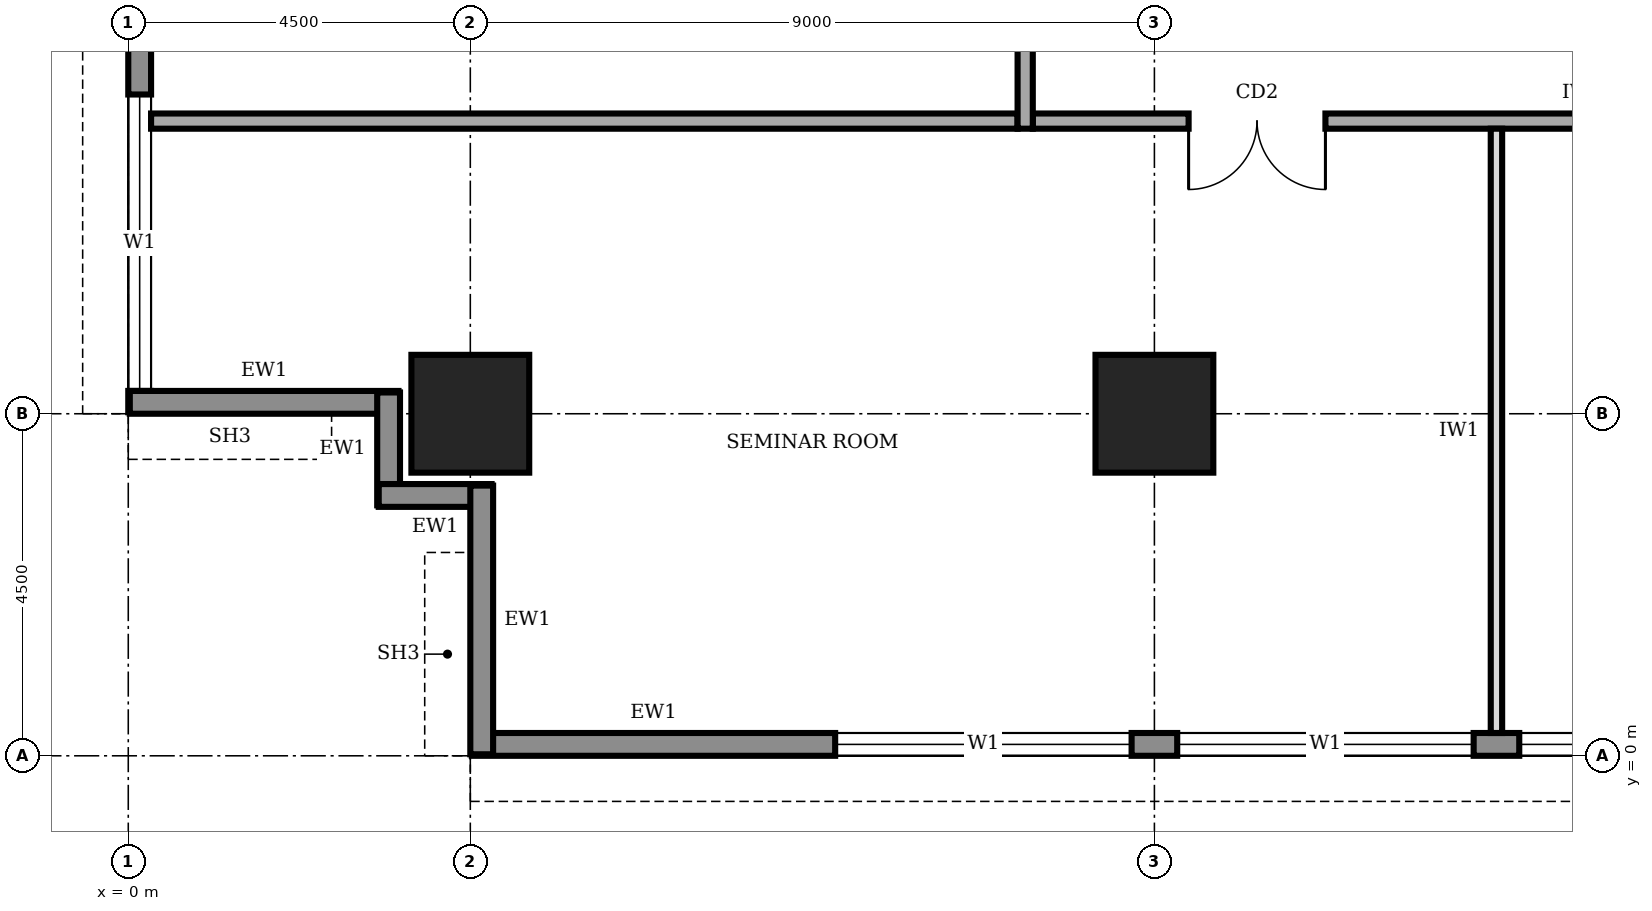
"""IFC4 building model, lengths in metres.
Left out: names, types, materials, properties, quantities, classifications, styles, units other than length and angle.
Written with IfcOpenShell. Run it as: python <this file> out.ifc"""

import sys

from ifc_helpers import new_model, si_unit, direction, frame, frame_2d, origin, origin_2d, place, context, subcontext, project, spatial, rectangle, extrude, element, fill, save


model = new_model("IFC4")
c1 = context("Model", 3, precision=1e-05, world=origin(), true_north=direction((0.0, 1.0)))
c2 = subcontext(c1, "Body", "Model", "MODEL_VIEW")
j1 = project(units=[si_unit("LENGTHUNIT", "METRE"), si_unit("PLANEANGLEUNIT", "RADIAN")], contexts=[c1])
p1 = place(None, origin())
s1 = spatial("IfcSite", under=j1, at=p1, CompositionType="ELEMENT")
p2 = place(p1, origin())
s2 = spatial("IfcBuilding", under=s1, at=p2, CompositionType="ELEMENT")
p3 = place(p2, frame((0.0, 0.0, 217.0)))
s3 = spatial("IfcBuildingStorey", under=s2, at=p3, CompositionType="ELEMENT", Elevation=217.0)
for number, where, z_axis, x_axis in (
    (1, (4.5, 4.5, 0.0), (0.0, 0.0, 1.0), (1.0, 0.0, 0.0)),
    (2, (13.5, 4.5, 0.0), (0.0, 0.0, 1.0), (1.0, 0.0, 0.0)),
):
    element("IfcColumn", number, at=place(p3, frame(where, z_axis=z_axis, x_axis=x_axis)), inside=s3, PredefinedType="COLUMN", context=c2, shape_type="SweptSolid", body=[
        extrude(rectangle(XDim=1.55, YDim=1.55, at=origin_2d()), origin(), (0.0, 0.0, 1.0), 4.0),
    ])
p4 = place(p3, frame((4.52, 0.15, 0.0), z_axis=(0.0, 0.0, 1.0), x_axis=(1.0, 0.0, 0.0)))
e3 = element("IfcWall", 3, at=p4, inside=s3, PredefinedType="STANDARD", context=c2, shape_type="SweptSolid", body=[
    extrude(rectangle(XDim=31.46, YDim=0.3, at=frame_2d((15.73, 0.0))), origin(), (0.0, 0.0, 1.0), 3.75),
])
p5 = place(p4, frame((4.78, 0.0, 0.9)))
e4 = element("IfcOpeningElement", 4, at=p5, cuts=e3, PredefinedType="OPENING", context=c2, shape_type="SweptSolid", body=[
    extrude(rectangle(XDim=3.9, YDim=2.2, at=frame_2d((1.95, 1.1))), frame((0.0, 0.16, 0.0), z_axis=(0.0, -1.0, 0.0), x_axis=(1.0, 0.0, 0.0)), (0.0, 0.0, 1.0), 0.32),
])
p6 = place(p4, frame((9.28, 0.0, 0.9)))
e5 = element("IfcOpeningElement", 5, at=p6, cuts=e3, PredefinedType="OPENING", context=c2, shape_type="SweptSolid", body=[
    extrude(rectangle(XDim=3.9, YDim=2.2, at=frame_2d((1.95, 1.1))), frame((0.0, 0.16, 0.0), z_axis=(0.0, -1.0, 0.0), x_axis=(1.0, 0.0, 0.0)), (0.0, 0.0, 1.0), 0.32),
])
p7 = place(p4, frame((13.78, 0.0, 0.9)))
e6 = element("IfcOpeningElement", 6, at=p7, cuts=e3, PredefinedType="OPENING", context=c2, shape_type="SweptSolid", body=[
    extrude(rectangle(XDim=3.9, YDim=2.2, at=frame_2d((1.95, 1.1))), frame((0.0, 0.16, 0.0), z_axis=(0.0, -1.0, 0.0), x_axis=(1.0, 0.0, 0.0)), (0.0, 0.0, 1.0), 0.32),
])
p8 = place(p4, frame((18.28, 0.0, 0.9)))
e7 = element("IfcOpeningElement", 7, at=p8, cuts=e3, PredefinedType="OPENING", context=c2, shape_type="SweptSolid", body=[
    extrude(rectangle(XDim=3.9, YDim=2.2, at=frame_2d((1.95, 1.1))), frame((0.0, 0.16, 0.0), z_axis=(0.0, -1.0, 0.0), x_axis=(1.0, 0.0, 0.0)), (0.0, 0.0, 1.0), 0.32),
])
p9 = place(p4, frame((22.78, 0.0, 0.9)))
e8 = element("IfcOpeningElement", 8, at=p9, cuts=e3, PredefinedType="OPENING", context=c2, shape_type="SweptSolid", body=[
    extrude(rectangle(XDim=3.9, YDim=2.2, at=frame_2d((1.95, 1.1))), frame((0.0, 0.16, 0.0), z_axis=(0.0, -1.0, 0.0), x_axis=(1.0, 0.0, 0.0)), (0.0, 0.0, 1.0), 0.32),
])
p10 = place(p4, frame((27.28, 0.0, 0.9)))
e9 = element("IfcOpeningElement", 9, at=p10, cuts=e3, PredefinedType="OPENING", context=c2, shape_type="SweptSolid", body=[
    extrude(rectangle(XDim=3.9, YDim=2.2, at=frame_2d((1.95, 1.1))), frame((0.0, 0.16, 0.0), z_axis=(0.0, -1.0, 0.0), x_axis=(1.0, 0.0, 0.0)), (0.0, 0.0, 1.0), 0.32),
])
p11 = place(p3, frame((0.15, 35.98, 0.0), z_axis=(0.0, 0.0, 1.0), x_axis=(0.0, -1.0, 0.0)))
e10 = element("IfcWall", 10, at=p11, inside=s3, PredefinedType="STANDARD", context=c2, shape_type="SweptSolid", body=[
    extrude(rectangle(XDim=31.46, YDim=0.3, at=frame_2d((15.73, 0.0))), origin(), (0.0, 0.0, 1.0), 3.75),
])
p12 = place(p11, frame((27.28, 0.0, 0.9)))
e11 = element("IfcOpeningElement", 11, at=p12, cuts=e10, PredefinedType="OPENING", context=c2, shape_type="SweptSolid", body=[
    extrude(rectangle(XDim=3.9, YDim=2.2, at=frame_2d((1.95, 1.1))), frame((0.0, 0.16, 0.0), z_axis=(0.0, -1.0, 0.0), x_axis=(1.0, 0.0, 0.0)), (0.0, 0.0, 1.0), 0.32),
])
p13 = place(p11, frame((22.78, 0.0, 0.9)))
e12 = element("IfcOpeningElement", 12, at=p13, cuts=e10, PredefinedType="OPENING", context=c2, shape_type="SweptSolid", body=[
    extrude(rectangle(XDim=3.9, YDim=2.2, at=frame_2d((1.95, 1.1))), frame((0.0, 0.16, 0.0), z_axis=(0.0, -1.0, 0.0), x_axis=(1.0, 0.0, 0.0)), (0.0, 0.0, 1.0), 0.32),
])
p14 = place(p11, frame((18.28, 0.0, 0.9)))
e13 = element("IfcOpeningElement", 13, at=p14, cuts=e10, PredefinedType="OPENING", context=c2, shape_type="SweptSolid", body=[
    extrude(rectangle(XDim=3.9, YDim=2.2, at=frame_2d((1.95, 1.1))), frame((0.0, 0.16, 0.0), z_axis=(0.0, -1.0, 0.0), x_axis=(1.0, 0.0, 0.0)), (0.0, 0.0, 1.0), 0.32),
])
p15 = place(p11, frame((13.78, 0.0, 0.9)))
e14 = element("IfcOpeningElement", 14, at=p15, cuts=e10, PredefinedType="OPENING", context=c2, shape_type="SweptSolid", body=[
    extrude(rectangle(XDim=3.9, YDim=2.2, at=frame_2d((1.95, 1.1))), frame((0.0, 0.16, 0.0), z_axis=(0.0, -1.0, 0.0), x_axis=(1.0, 0.0, 0.0)), (0.0, 0.0, 1.0), 0.32),
])
p16 = place(p11, frame((9.28, 0.0, 0.9)))
e15 = element("IfcOpeningElement", 15, at=p16, cuts=e10, PredefinedType="OPENING", context=c2, shape_type="SweptSolid", body=[
    extrude(rectangle(XDim=3.9, YDim=2.2, at=frame_2d((1.95, 1.1))), frame((0.0, 0.16, 0.0), z_axis=(0.0, -1.0, 0.0), x_axis=(1.0, 0.0, 0.0)), (0.0, 0.0, 1.0), 0.32),
])
p17 = place(p11, frame((4.78, 0.0, 0.9)))
e16 = element("IfcOpeningElement", 16, at=p17, cuts=e10, PredefinedType="OPENING", context=c2, shape_type="SweptSolid", body=[
    extrude(rectangle(XDim=3.9, YDim=2.2, at=frame_2d((1.95, 1.1))), frame((0.0, 0.16, 0.0), z_axis=(0.0, -1.0, 0.0), x_axis=(1.0, 0.0, 0.0)), (0.0, 0.0, 1.0), 0.32),
])
p18 = place(p3, frame((0.02, 4.65, 0.0), z_axis=(0.0, 0.0, 1.0), x_axis=(1.0, 0.0, 0.0)))
e17 = element("IfcWall", 17, at=p18, inside=s3, PredefinedType="STANDARD", context=c2, shape_type="SweptSolid", body=[
    extrude(rectangle(XDim=3.535, YDim=0.3, at=frame_2d((1.768, 0.0))), origin(), (0.0, 0.0, 1.0), 2.85),
])
for number, where, z_axis, x_axis in (
    (18, (3.425, 4.78, 0.0), (0.0, 0.0, 1.0), (0.0, -1.0, 0.0)),
    (19, (3.295, 3.425, 0.0), (0.0, 0.0, 1.0), (1.0, 0.0, 0.0)),
):
    element("IfcWall", number, at=place(p3, frame(where, z_axis=z_axis, x_axis=x_axis)), inside=s3, PredefinedType="STANDARD", context=c2, shape_type="SweptSolid", body=[
        extrude(rectangle(XDim=1.485, YDim=0.3, at=frame_2d((0.743, 0.0))), origin(), (0.0, 0.0, 1.0), 3.75),
    ])
p19 = place(p3, frame((4.65, 3.555, 0.0), z_axis=(0.0, 0.0, 1.0), x_axis=(0.0, -1.0, 0.0)))
e20 = element("IfcWall", 20, at=p19, inside=s3, PredefinedType="STANDARD", context=c2, shape_type="SweptSolid", body=[
    extrude(rectangle(XDim=3.535, YDim=0.3, at=frame_2d((1.768, 0.0))), origin(), (0.0, 0.0, 1.0), 2.85),
])
p20 = place(p3, frame((11.9, 8.35, 0.0), z_axis=(0.0, 0.0, 1.0), x_axis=(1.0, 0.0, 0.0)))
e21 = element("IfcWall", 21, at=p20, inside=s3, PredefinedType="SOLIDWALL", context=c2, shape_type="SweptSolid", body=[
    extrude(rectangle(XDim=16.9, YDim=0.2, at=frame_2d((8.45, 0.0))), origin(), (0.0, 0.0, 1.0), 3.75),
])
p21 = place(p20, frame((2.05, 0.0, 0.0)))
e22 = element("IfcOpeningElement", 22, at=p21, cuts=e21, PredefinedType="OPENING", context=c2, shape_type="SweptSolid", body=[
    extrude(rectangle(XDim=1.8, YDim=2.1, at=frame_2d((0.9, 1.05))), frame((0.0, 0.11, 0.0), z_axis=(0.0, -1.0, 0.0), x_axis=(1.0, 0.0, 0.0)), (0.0, 0.0, 1.0), 0.22),
])
p22 = place(p20, frame((10.6, 0.0, 0.0)))
e23 = element("IfcOpeningElement", 23, at=p22, cuts=e21, PredefinedType="OPENING", context=c2, shape_type="SweptSolid", body=[
    extrude(rectangle(XDim=1.8, YDim=2.1, at=frame_2d((0.9, 1.05))), frame((0.0, 0.11, 0.0), z_axis=(0.0, -1.0, 0.0), x_axis=(1.0, 0.0, 0.0)), (0.0, 0.0, 1.0), 0.22),
])
p23 = place(p3, frame((11.8, 32.05, 0.0), z_axis=(0.0, 0.0, 1.0), x_axis=(0.0, -1.0, 0.0)))
e24 = element("IfcWall", 24, at=p23, inside=s3, PredefinedType="SOLIDWALL", context=c2, shape_type="SweptSolid", body=[
    extrude(rectangle(XDim=23.8, YDim=0.2, at=frame_2d((11.9, 0.0))), origin(), (0.0, 0.0, 1.0), 3.75),
])
p24 = place(p23, frame((20.675, 0.0, 0.0)))
e25 = element("IfcOpeningElement", 25, at=p24, cuts=e24, PredefinedType="OPENING", context=c2, shape_type="SweptSolid", body=[
    extrude(rectangle(XDim=1.0, YDim=2.1, at=frame_2d((0.5, 1.05))), frame((0.0, 0.11, 0.0), z_axis=(0.0, -1.0, 0.0), x_axis=(1.0, 0.0, 0.0)), (0.0, 0.0, 1.0), 0.22),
])
p25 = place(p23, frame((16.4, 0.0, 0.0)))
e26 = element("IfcOpeningElement", 26, at=p25, cuts=e24, PredefinedType="OPENING", context=c2, shape_type="SweptSolid", body=[
    extrude(rectangle(XDim=0.9, YDim=2.1, at=frame_2d((0.45, 1.05))), frame((0.0, 0.11, 0.0), z_axis=(0.0, -1.0, 0.0), x_axis=(1.0, 0.0, 0.0)), (0.0, 0.0, 1.0), 0.22),
])
p26 = place(p23, frame((11.6, 0.0, 0.0)))
e27 = element("IfcOpeningElement", 27, at=p26, cuts=e24, PredefinedType="OPENING", context=c2, shape_type="SweptSolid", body=[
    extrude(rectangle(XDim=0.9, YDim=2.1, at=frame_2d((0.45, 1.05))), frame((0.0, 0.11, 0.0), z_axis=(0.0, -1.0, 0.0), x_axis=(1.0, 0.0, 0.0)), (0.0, 0.0, 1.0), 0.22),
])
p27 = place(p23, frame((8.55, 0.0, 0.0)))
e28 = element("IfcOpeningElement", 28, at=p27, cuts=e24, PredefinedType="OPENING", context=c2, shape_type="SweptSolid", body=[
    extrude(rectangle(XDim=0.9, YDim=2.1, at=frame_2d((0.45, 1.05))), frame((0.0, 0.11, 0.0), z_axis=(0.0, -1.0, 0.0), x_axis=(1.0, 0.0, 0.0)), (0.0, 0.0, 1.0), 0.22),
])
p28 = place(p23, frame((5.55, 0.0, 0.0)))
e29 = element("IfcOpeningElement", 29, at=p28, cuts=e24, PredefinedType="OPENING", context=c2, shape_type="SweptSolid", body=[
    extrude(rectangle(XDim=1.0, YDim=2.1, at=frame_2d((0.5, 1.05))), frame((0.0, 0.11, 0.0), z_axis=(0.0, -1.0, 0.0), x_axis=(1.0, 0.0, 0.0)), (0.0, 0.0, 1.0), 0.22),
])
p29 = place(p23, frame((13.65, 0.0, 0.0)))
e30 = element("IfcOpeningElement", 30, at=p29, cuts=e24, PredefinedType="OPENING", context=c2, shape_type="SweptSolid", body=[
    extrude(rectangle(XDim=1.0, YDim=2.1, at=frame_2d((0.5, 1.05))), frame((0.0, 0.11, 0.0), z_axis=(0.0, -1.0, 0.0), x_axis=(1.0, 0.0, 0.0)), (0.0, 0.0, 1.0), 0.22),
])
p30 = place(p23, frame((1.925, 0.0, 0.0)))
e31 = element("IfcOpeningElement", 31, at=p30, cuts=e24, PredefinedType="OPENING", context=c2, shape_type="SweptSolid", body=[
    extrude(rectangle(XDim=1.0, YDim=2.1, at=frame_2d((0.5, 1.05))), frame((0.0, 0.11, 0.0), z_axis=(0.0, -1.0, 0.0), x_axis=(1.0, 0.0, 0.0)), (0.0, 0.0, 1.0), 0.22),
])
p31 = place(p3, frame((0.3, 8.35, 0.0), z_axis=(0.0, 0.0, 1.0), x_axis=(1.0, 0.0, 0.0)))
e32 = element("IfcWall", 32, at=p31, inside=s3, PredefinedType="SOLIDWALL", context=c2, shape_type="SweptSolid", body=[
    extrude(rectangle(XDim=11.4, YDim=0.2, at=frame_2d((5.7, 0.0))), origin(), (0.0, 0.0, 1.0), 3.75),
])
p32 = place(p3, frame((18.0, 0.3, 0.0), z_axis=(0.0, 0.0, 1.0), x_axis=(0.0, 1.0, 0.0)))
e33 = element("IfcWall", 33, at=p32, inside=s3, PredefinedType="PARTITIONING", context=c2, shape_type="SweptSolid", body=[
    extrude(rectangle(XDim=7.95, YDim=0.15, at=frame_2d((3.975, 0.0))), origin(), (0.0, 0.0, 1.0), 3.75),
])
p33 = place(p5, origin())
e34 = element("IfcWindow", 34, at=p33, inside=s3, PartitioningType="SINGLE_PANEL", PredefinedType="WINDOW", context=c2, shape_type="SweptSolid", body=[
    extrude(rectangle(XDim=3.9, YDim=2.2, at=frame_2d((1.95, 1.1))), frame((0.0, 0.03, 0.0), z_axis=(0.0, -1.0, 0.0), x_axis=(1.0, 0.0, 0.0)), (0.0, 0.0, 1.0), 0.06),
])
fill(e4, e34)
p34 = place(p6, origin())
e35 = element("IfcWindow", 35, at=p34, inside=s3, PartitioningType="SINGLE_PANEL", PredefinedType="WINDOW", context=c2, shape_type="SweptSolid", body=[
    extrude(rectangle(XDim=3.9, YDim=2.2, at=frame_2d((1.95, 1.1))), frame((0.0, 0.03, 0.0), z_axis=(0.0, -1.0, 0.0), x_axis=(1.0, 0.0, 0.0)), (0.0, 0.0, 1.0), 0.06),
])
fill(e5, e35)
p35 = place(p7, origin())
e36 = element("IfcWindow", 36, at=p35, inside=s3, PartitioningType="SINGLE_PANEL", PredefinedType="WINDOW", context=c2, shape_type="SweptSolid", body=[
    extrude(rectangle(XDim=3.9, YDim=2.2, at=frame_2d((1.95, 1.1))), frame((0.0, 0.03, 0.0), z_axis=(0.0, -1.0, 0.0), x_axis=(1.0, 0.0, 0.0)), (0.0, 0.0, 1.0), 0.06),
])
fill(e6, e36)
p36 = place(p12, origin())
e37 = element("IfcWindow", 37, at=p36, inside=s3, PartitioningType="SINGLE_PANEL", PredefinedType="WINDOW", context=c2, shape_type="SweptSolid", body=[
    extrude(rectangle(XDim=3.9, YDim=2.2, at=frame_2d((1.95, 1.1))), frame((0.0, 0.03, 0.0), z_axis=(0.0, -1.0, 0.0), x_axis=(1.0, 0.0, 0.0)), (0.0, 0.0, 1.0), 0.06),
])
fill(e11, e37)
p37 = place(p21, frame((1.8, 0.0, 0.0), z_axis=(0.0, 0.0, 1.0), x_axis=(-1.0, 0.0, 0.0)))
e38 = element("IfcDoor", 38, at=p37, inside=s3, OperationType="DOUBLE_DOOR_SINGLE_SWING", PredefinedType="DOOR", context=c2, shape_type="SweptSolid", body=[
    extrude(rectangle(XDim=1.8, YDim=2.1, at=frame_2d((0.9, 1.05))), frame((0.0, 0.025, 0.0), z_axis=(0.0, -1.0, 0.0), x_axis=(1.0, 0.0, 0.0)), (0.0, 0.0, 1.0), 0.05),
])
fill(e22, e38)
save(model, sys.argv[1])
